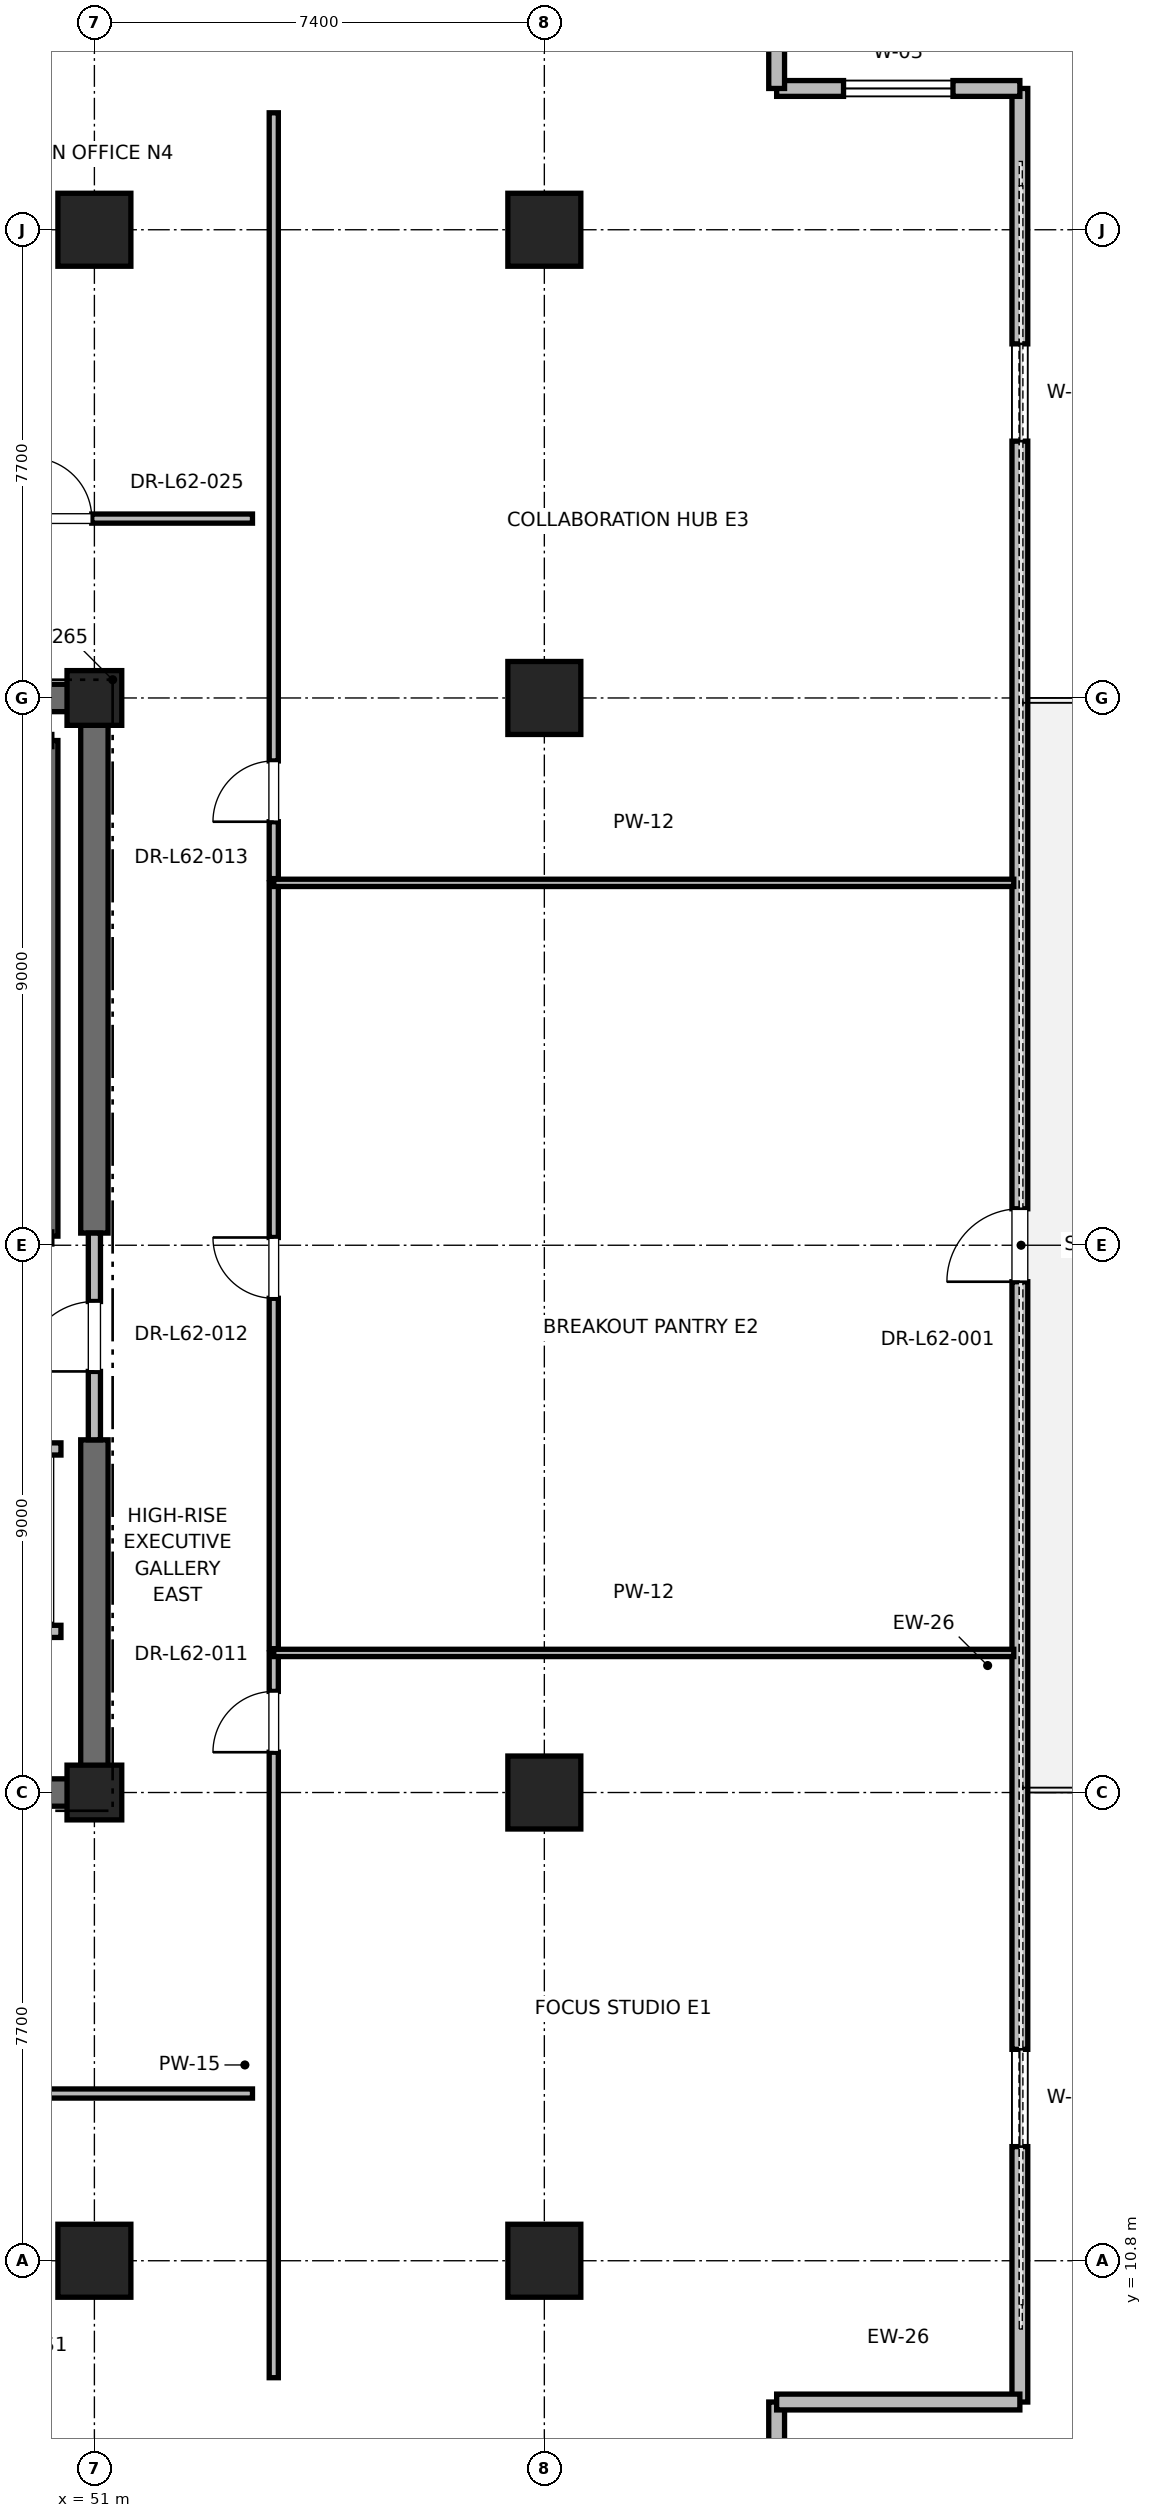
"""IFC4 building model, lengths in metres.
Left out: names, types, materials, properties, quantities, classifications, styles, units other than length and angle.
Written with IfcOpenShell. Run it as: python <this file> out.ifc"""

import sys

from ifc_helpers import new_model, si_unit, direction, frame, frame_2d, origin, origin_2d, place, context, subcontext, project, spatial, rectangle, extrude, element, fill, save


model = new_model("IFC4")
c1 = context("Model", 3, precision=1e-05, world=origin(), true_north=direction((0.0, 1.0)))
c2 = subcontext(c1, "Body", "Model", "MODEL_VIEW")
j1 = project(units=[si_unit("LENGTHUNIT", "METRE"), si_unit("PLANEANGLEUNIT", "RADIAN")], contexts=[c1])
p1 = place(None, origin())
s1 = spatial("IfcSite", under=j1, at=p1, CompositionType="ELEMENT")
p2 = place(p1, origin())
s2 = spatial("IfcBuilding", under=s1, at=p2, CompositionType="ELEMENT")
p3 = place(p2, frame((0.0, 0.0, 267.2)))
s3 = spatial("IfcBuildingStorey", under=s2, at=p3, CompositionType="ELEMENT", Elevation=267.2)
for number, where, z_axis, x_axis in (
    (1, (51.0, 10.8, 0.0), (0.0, 0.0, 1.0), (1.0, 0.0, 0.0)),
    (2, (51.0, 44.2, 0.0), (0.0, 0.0, 1.0), (1.0, 0.0, 0.0)),
    (3, (58.4, 18.5, 0.0), (0.0, 0.0, 1.0), (1.0, 0.0, 0.0)),
    (4, (58.4, 36.5, 0.0), (0.0, 0.0, 1.0), (1.0, 0.0, 0.0)),
    (5, (58.4, 10.8, 0.0), (0.0, 0.0, 1.0), (1.0, 0.0, 0.0)),
    (6, (58.4, 44.2, 0.0), (0.0, 0.0, 1.0), (1.0, 0.0, 0.0)),
):
    element("IfcColumn", number, at=place(p3, frame(where, z_axis=z_axis, x_axis=x_axis)), inside=s3, PredefinedType="COLUMN", context=c2, shape_type="SweptSolid", body=[
        extrude(rectangle(XDim=1.2, YDim=1.2, at=origin_2d()), origin(), (0.0, 0.0, 1.0), 4.0),
    ])
for number, where, z_axis, x_axis in (
    (7, (51.0, 18.5, 0.0), (0.0, 0.0, 1.0), (1.0, 0.0, 0.0)),
    (8, (51.0, 36.5, 0.0), (0.0, 0.0, 1.0), (1.0, 0.0, 0.0)),
):
    element("IfcColumn", number, at=place(p3, frame(where, z_axis=z_axis, x_axis=x_axis)), inside=s3, PredefinedType="PILASTER", context=c2, shape_type="SweptSolid", body=[
        extrude(rectangle(XDim=0.9, YDim=0.9, at=origin_2d()), origin(), (0.0, 0.0, 1.0), 4.0),
    ])
p4 = place(p3, frame((41.8, 18.5, 0.0), z_axis=(0.0, 0.0, 1.0), x_axis=(1.0, 0.0, 0.0)))
e9 = element("IfcWall", 9, at=p4, inside=s3, PredefinedType="SHEAR", context=c2, shape_type="SweptSolid", body=[
    extrude(rectangle(XDim=9.2, YDim=0.45, at=frame_2d((4.6, 0.0))), origin(), (0.0, 0.0, 1.0), 3.785),
])
for number, where, z_axis, x_axis in (
    (10, (45.2, 36.5, 0.0), (0.0, 0.0, 1.0), (1.0, 0.0, 0.0)),
    (11, (51.0, 18.5, 0.0), (0.0, 0.0, 1.0), (0.0, 1.0, 0.0)),
):
    element("IfcWall", number, at=place(p3, frame(where, z_axis=z_axis, x_axis=x_axis)), inside=s3, PredefinedType="SHEAR", context=c2, shape_type="SweptSolid", body=[
        extrude(rectangle(XDim=5.8, YDim=0.45, at=frame_2d((2.9, 0.0))), origin(), (0.0, 0.0, 1.0), 3.785),
    ])
p5 = place(p3, frame((51.0, 27.7, 0.0), z_axis=(0.0, 0.0, 1.0), x_axis=(0.0, 1.0, 0.0)))
e12 = element("IfcWall", 12, at=p5, inside=s3, PredefinedType="SHEAR", context=c2, shape_type="SweptSolid", body=[
    extrude(rectangle(XDim=8.8, YDim=0.45, at=frame_2d((4.4, 0.0))), origin(), (0.0, 0.0, 1.0), 3.785),
])
p6 = place(p3, frame((66.221, 8.477, 0.0), z_axis=(0.0, 0.0, 1.0), x_axis=(0.0, 1.0, 0.0)))
e13 = element("IfcWall", 13, at=p6, inside=s3, PredefinedType="PARAPET", context=c2, shape_type="SweptSolid", body=[
    extrude(rectangle(XDim=38.047, YDim=0.26, at=frame_2d((19.023, 0.0))), origin(), (0.0, 0.0, 1.0), 3.123),
])
p7 = place(p6, frame((4.2, 0.0, 0.85)))
e14 = element("IfcOpeningElement", 14, at=p7, cuts=e13, PredefinedType="OPENING", context=c2, shape_type="SweptSolid", body=[
    extrude(rectangle(XDim=1.6, YDim=2.1, at=frame_2d((0.8, 1.05))), frame((0.0, 0.13, 0.0), z_axis=(0.0, -1.0, 0.0), x_axis=(1.0, 0.0, 0.0)), (0.0, 0.0, 1.0), 0.26),
])
p8 = place(p6, frame((18.423, 0.0, 0.0)))
e15 = element("IfcOpeningElement", 15, at=p8, cuts=e13, PredefinedType="OPENING", context=c2, shape_type="SweptSolid", body=[
    extrude(rectangle(XDim=1.2, YDim=2.2, at=frame_2d((0.6, 1.1))), frame((0.0, 0.13, 0.0), z_axis=(0.0, -1.0, 0.0), x_axis=(1.0, 0.0, 0.0)), (0.0, 0.0, 1.0), 0.26),
])
p9 = place(p6, frame((32.247, 0.0, 0.85)))
e16 = element("IfcOpeningElement", 16, at=p9, cuts=e13, PredefinedType="OPENING", context=c2, shape_type="SweptSolid", body=[
    extrude(rectangle(XDim=1.6, YDim=2.1, at=frame_2d((0.8, 1.05))), frame((0.0, 0.13, 0.0), z_axis=(0.0, -1.0, 0.0), x_axis=(1.0, 0.0, 0.0)), (0.0, 0.0, 1.0), 0.26),
])
p10 = place(p3, frame((62.221, 4.977, 0.0), z_axis=(0.0, 0.0, 1.0), x_axis=(0.0, 1.0, 0.0)))
e17 = element("IfcWall", 17, at=p10, inside=s3, PredefinedType="PARAPET", context=c2, shape_type="SweptSolid", body=[
    extrude(rectangle(XDim=3.5, YDim=0.26, at=frame_2d((1.75, 0.0))), origin(), (0.0, 0.0, 1.0), 3.785),
])
p11 = place(p10, frame((0.85, 0.0, 0.85)))
e18 = element("IfcOpeningElement", 18, at=p11, cuts=e17, PredefinedType="OPENING", context=c2, shape_type="SweptSolid", body=[
    extrude(rectangle(XDim=1.8, YDim=2.2, at=frame_2d((0.9, 1.1))), frame((0.0, 0.13, 0.0), z_axis=(0.0, -1.0, 0.0), x_axis=(1.0, 0.0, 0.0)), (0.0, 0.0, 1.0), 0.26),
])
p12 = place(p3, frame((62.221, 8.477, 0.0), z_axis=(0.0, 0.0, 1.0), x_axis=(1.0, 0.0, 0.0)))
e19 = element("IfcWall", 19, at=p12, inside=s3, PredefinedType="PARAPET", context=c2, shape_type="SweptSolid", body=[
    extrude(rectangle(XDim=4.0, YDim=0.26, at=frame_2d((2.0, 0.0))), origin(), (0.0, 0.0, 1.0), 3.785),
])
p13 = place(p3, frame((66.221, 46.523, 0.0), z_axis=(0.0, 0.0, 1.0), x_axis=(-1.0, 0.0, 0.0)))
e20 = element("IfcWall", 20, at=p13, inside=s3, PredefinedType="PARAPET", context=c2, shape_type="SweptSolid", body=[
    extrude(rectangle(XDim=4.0, YDim=0.26, at=frame_2d((2.0, 0.0))), origin(), (0.0, 0.0, 1.0), 3.785),
])
p14 = place(p13, frame((1.1, 0.0, 0.85)))
e21 = element("IfcOpeningElement", 21, at=p14, cuts=e20, PredefinedType="OPENING", context=c2, shape_type="SweptSolid", body=[
    extrude(rectangle(XDim=1.8, YDim=2.2, at=frame_2d((0.9, 1.1))), frame((0.0, 0.13, 0.0), z_axis=(0.0, -1.0, 0.0), x_axis=(1.0, 0.0, 0.0)), (0.0, 0.0, 1.0), 0.26),
])
p15 = place(p3, frame((62.221, 46.523, 0.0), z_axis=(0.0, 0.0, 1.0), x_axis=(0.0, 1.0, 0.0)))
e22 = element("IfcWall", 22, at=p15, inside=s3, PredefinedType="PARAPET", context=c2, shape_type="SweptSolid", body=[
    extrude(rectangle(XDim=3.5, YDim=0.26, at=frame_2d((1.75, 0.0))), origin(), (0.0, 0.0, 1.0), 3.785),
])
p16 = place(p3, frame((50.3, 27.65, 0.0), z_axis=(0.0, 0.0, 1.0), x_axis=(0.0, 1.0, 0.0)))
e23 = element("IfcWall", 23, at=p16, inside=s3, PredefinedType="SOLIDWALL", context=c2, shape_type="SweptSolid", body=[
    extrude(rectangle(XDim=8.15, YDim=0.2, at=frame_2d((4.075, 0.0))), origin(), (0.0, 0.0, 1.0), 3.785),
])
p17 = place(p3, frame((51.0, 24.3, 0.0), z_axis=(0.0, 0.0, 1.0), x_axis=(0.0, 1.0, 0.0)))
e24 = element("IfcWall", 24, at=p17, inside=s3, PredefinedType="PARTITIONING", context=c2, shape_type="SweptSolid", body=[
    extrude(rectangle(XDim=3.4, YDim=0.2, at=frame_2d((1.7, 0.0))), origin(), (0.0, 0.0, 1.0), 2.865),
])
p18 = place(p17, frame((1.125, 0.0, 0.0)))
e25 = element("IfcOpeningElement", 25, at=p18, cuts=e24, PredefinedType="OPENING", context=c2, shape_type="SweptSolid", body=[
    extrude(rectangle(XDim=1.15, YDim=2.2, at=frame_2d((0.575, 1.1))), frame((0.0, 0.1, 0.0), z_axis=(0.0, -1.0, 0.0), x_axis=(1.0, 0.0, 0.0)), (0.0, 0.0, 1.0), 0.2),
])
p19 = place(p3, frame((47.85, 21.15, 0.0), z_axis=(0.0, 0.0, 1.0), x_axis=(1.0, 0.0, 0.0)))
e26 = element("IfcWall", 26, at=p19, inside=s3, PredefinedType="SOLIDWALL", context=c2, shape_type="SweptSolid", body=[
    extrude(rectangle(XDim=2.6, YDim=0.2, at=frame_2d((1.3, 0.0))), origin(), (0.0, 0.0, 1.0), 3.785),
])
p20 = place(p3, frame((50.45, 24.15, 0.0), z_axis=(0.0, 0.0, 1.0), x_axis=(-1.0, 0.0, 0.0)))
e27 = element("IfcWall", 27, at=p20, inside=s3, PredefinedType="SOLIDWALL", context=c2, shape_type="SweptSolid", body=[
    extrude(rectangle(XDim=2.6, YDim=0.2, at=frame_2d((1.3, 0.0))), origin(), (0.0, 0.0, 1.0), 2.865),
])
p21 = place(p20, frame((0.75, 0.0, 0.0)))
e28 = element("IfcOpeningElement", 28, at=p21, cuts=e27, PredefinedType="OPENING", context=c2, shape_type="SweptSolid", body=[
    extrude(rectangle(XDim=1.1, YDim=2.2, at=frame_2d((0.55, 1.1))), frame((0.0, 0.1, 0.0), z_axis=(0.0, -1.0, 0.0), x_axis=(1.0, 0.0, 0.0)), (0.0, 0.0, 1.0), 0.2),
])
p22 = place(p3, frame((47.414, 39.45, 0.0), z_axis=(0.0, 0.0, 1.0), x_axis=(1.0, 0.0, 0.0)))
e29 = element("IfcWall", 29, at=p22, inside=s3, PredefinedType="PARTITIONING", context=c2, shape_type="SweptSolid", body=[
    extrude(rectangle(XDim=6.186, YDim=0.15, at=frame_2d((3.093, 0.0))), origin(), (0.0, 0.0, 1.0), 2.85),
])
p23 = place(p22, frame((2.543, 0.0, 0.0)))
e30 = element("IfcOpeningElement", 30, at=p23, cuts=e29, PredefinedType="OPENING", context=c2, shape_type="SweptSolid", body=[
    extrude(rectangle(XDim=1.0, YDim=2.15, at=frame_2d((0.5, 1.075))), frame((0.0, 0.075, 0.0), z_axis=(0.0, -1.0, 0.0), x_axis=(1.0, 0.0, 0.0)), (0.0, 0.0, 1.0), 0.15),
])
p24 = place(p3, frame((26.4, 13.55, 0.0), z_axis=(0.0, 0.0, 1.0), x_axis=(1.0, 0.0, 0.0)))
e31 = element("IfcWall", 31, at=p24, inside=s3, PredefinedType="PARTITIONING", context=c2, shape_type="SweptSolid", body=[
    extrude(rectangle(XDim=27.2, YDim=0.15, at=frame_2d((13.6, 0.0))), origin(), (0.0, 0.0, 1.0), 2.85),
])
p25 = place(p24, frame((13.075, 0.0, 0.0)))
e32 = element("IfcOpeningElement", 32, at=p25, cuts=e31, PredefinedType="OPENING", context=c2, shape_type="SweptSolid", body=[
    extrude(rectangle(XDim=1.05, YDim=2.2, at=frame_2d((0.525, 1.1))), frame((0.0, 0.075, 0.0), z_axis=(0.0, -1.0, 0.0), x_axis=(1.0, 0.0, 0.0)), (0.0, 0.0, 1.0), 0.15),
])
p26 = place(p3, frame((53.95, 8.877, 0.0), z_axis=(0.0, 0.0, 1.0), x_axis=(0.0, 1.0, 0.0)))
e33 = element("IfcWall", 33, at=p26, inside=s3, PredefinedType="PARTITIONING", context=c2, shape_type="SweptSolid", body=[
    extrude(rectangle(XDim=11.919, YDim=0.15, at=frame_2d((5.959, 0.0))), origin(), (0.0, 0.0, 1.0), 2.85),
])
p27 = place(p26, frame((10.286, 0.0, 0.0)))
e34 = element("IfcOpeningElement", 34, at=p27, cuts=e33, PredefinedType="OPENING", context=c2, shape_type="SweptSolid", body=[
    extrude(rectangle(XDim=1.0, YDim=2.15, at=frame_2d((0.5, 1.075))), frame((0.0, 0.075, 0.0), z_axis=(0.0, -1.0, 0.0), x_axis=(1.0, 0.0, 0.0)), (0.0, 0.0, 1.0), 0.15),
])
p28 = place(p3, frame((53.95, 20.796, 0.0), z_axis=(0.0, 0.0, 1.0), x_axis=(1.0, 0.0, 0.0)))
e35 = element("IfcWall", 35, at=p28, inside=s3, PredefinedType="PARTITIONING", context=c2, shape_type="SweptSolid", body=[
    extrude(rectangle(XDim=12.171, YDim=0.12, at=frame_2d((6.085, 0.0))), origin(), (0.0, 0.0, 1.0), 2.85),
])
p29 = place(p3, frame((53.95, 20.865, 0.0), z_axis=(0.0, 0.0, 1.0), x_axis=(0.0, 1.0, 0.0)))
e36 = element("IfcWall", 36, at=p29, inside=s3, PredefinedType="PARTITIONING", context=c2, shape_type="SweptSolid", body=[
    extrude(rectangle(XDim=12.594, YDim=0.15, at=frame_2d((6.297, 0.0))), origin(), (0.0, 0.0, 1.0), 2.85),
])
p30 = place(p29, frame((5.762, 0.0, 0.0)))
e37 = element("IfcOpeningElement", 37, at=p30, cuts=e36, PredefinedType="OPENING", context=c2, shape_type="SweptSolid", body=[
    extrude(rectangle(XDim=1.0, YDim=2.15, at=frame_2d((0.5, 1.075))), frame((0.0, 0.075, 0.0), z_axis=(0.0, -1.0, 0.0), x_axis=(1.0, 0.0, 0.0)), (0.0, 0.0, 1.0), 0.15),
])
p31 = place(p3, frame((53.95, 33.459, 0.0), z_axis=(0.0, 0.0, 1.0), x_axis=(1.0, 0.0, 0.0)))
e38 = element("IfcWall", 38, at=p31, inside=s3, PredefinedType="PARTITIONING", context=c2, shape_type="SweptSolid", body=[
    extrude(rectangle(XDim=12.171, YDim=0.12, at=frame_2d((6.085, 0.0))), origin(), (0.0, 0.0, 1.0), 2.85),
])
p32 = place(p3, frame((53.95, 33.53, 0.0), z_axis=(0.0, 0.0, 1.0), x_axis=(0.0, 1.0, 0.0)))
e39 = element("IfcWall", 39, at=p32, inside=s3, PredefinedType="PARTITIONING", context=c2, shape_type="SweptSolid", body=[
    extrude(rectangle(XDim=12.594, YDim=0.15, at=frame_2d((6.297, 0.0))), origin(), (0.0, 0.0, 1.0), 2.85),
])
p33 = place(p32, frame((0.935, 0.0, 0.0)))
e40 = element("IfcOpeningElement", 40, at=p33, cuts=e39, PredefinedType="OPENING", context=c2, shape_type="SweptSolid", body=[
    extrude(rectangle(XDim=1.0, YDim=2.15, at=frame_2d((0.5, 1.075))), frame((0.0, 0.075, 0.0), z_axis=(0.0, -1.0, 0.0), x_axis=(1.0, 0.0, 0.0)), (0.0, 0.0, 1.0), 0.15),
])
p34 = place(p7, origin())
e41 = element("IfcWindow", 41, at=p34, inside=s3, PartitioningType="SINGLE_PANEL", PredefinedType="WINDOW", context=c2, shape_type="SweptSolid", body=[
    extrude(rectangle(XDim=1.6, YDim=2.1, at=frame_2d((0.8, 1.05))), frame((0.0, 0.03, 0.0), z_axis=(0.0, -1.0, 0.0), x_axis=(1.0, 0.0, 0.0)), (0.0, 0.0, 1.0), 0.06),
])
fill(e14, e41)
p35 = place(p8, origin())
e42 = element("IfcDoor", 42, at=p35, inside=s3, OperationType="SINGLE_SWING_LEFT", PredefinedType="DOOR", context=c2, shape_type="SweptSolid", body=[
    extrude(rectangle(XDim=1.2, YDim=2.2, at=frame_2d((0.6, 1.1))), frame((0.0, 0.025, 0.0), z_axis=(0.0, -1.0, 0.0), x_axis=(1.0, 0.0, 0.0)), (0.0, 0.0, 1.0), 0.05),
])
fill(e15, e42)
p36 = place(p9, origin())
e43 = element("IfcWindow", 43, at=p36, inside=s3, PartitioningType="SINGLE_PANEL", PredefinedType="WINDOW", context=c2, shape_type="SweptSolid", body=[
    extrude(rectangle(XDim=1.6, YDim=2.1, at=frame_2d((0.8, 1.05))), frame((0.0, 0.03, 0.0), z_axis=(0.0, -1.0, 0.0), x_axis=(1.0, 0.0, 0.0)), (0.0, 0.0, 1.0), 0.06),
])
fill(e16, e43)
p37 = place(p14, origin())
e44 = element("IfcWindow", 44, at=p37, inside=s3, PartitioningType="SINGLE_PANEL", PredefinedType="WINDOW", context=c2, shape_type="SweptSolid", body=[
    extrude(rectangle(XDim=1.8, YDim=2.2, at=frame_2d((0.9, 1.1))), frame((0.0, 0.03, 0.0), z_axis=(0.0, -1.0, 0.0), x_axis=(1.0, 0.0, 0.0)), (0.0, 0.0, 1.0), 0.06),
])
fill(e21, e44)
p38 = place(p18, origin())
e45 = element("IfcDoor", 45, at=p38, inside=s3, OperationType="SINGLE_SWING_LEFT", PredefinedType="DOOR", context=c2, shape_type="SweptSolid", body=[
    extrude(rectangle(XDim=1.15, YDim=2.2, at=frame_2d((0.575, 1.1))), frame((0.0, 0.025, 0.0), z_axis=(0.0, -1.0, 0.0), x_axis=(1.0, 0.0, 0.0)), (0.0, 0.0, 1.0), 0.05),
])
fill(e25, e45)
p39 = place(p23, origin())
e46 = element("IfcDoor", 46, at=p39, inside=s3, OperationType="SINGLE_SWING_LEFT", PredefinedType="DOOR", context=c2, shape_type="SweptSolid", body=[
    extrude(rectangle(XDim=1.0, YDim=2.15, at=frame_2d((0.5, 1.075))), frame((0.0, 0.025, 0.0), z_axis=(0.0, -1.0, 0.0), x_axis=(1.0, 0.0, 0.0)), (0.0, 0.0, 1.0), 0.05),
])
fill(e30, e46)
p40 = place(p27, origin())
e47 = element("IfcDoor", 47, at=p40, inside=s3, OperationType="SINGLE_SWING_LEFT", PredefinedType="DOOR", context=c2, shape_type="SweptSolid", body=[
    extrude(rectangle(XDim=1.0, YDim=2.15, at=frame_2d((0.5, 1.075))), frame((0.0, 0.025, 0.0), z_axis=(0.0, -1.0, 0.0), x_axis=(1.0, 0.0, 0.0)), (0.0, 0.0, 1.0), 0.05),
])
fill(e34, e47)
p41 = place(p30, origin())
e48 = element("IfcDoor", 48, at=p41, inside=s3, OperationType="SINGLE_SWING_RIGHT", PredefinedType="DOOR", context=c2, shape_type="SweptSolid", body=[
    extrude(rectangle(XDim=1.0, YDim=2.15, at=frame_2d((0.5, 1.075))), frame((0.0, 0.025, 0.0), z_axis=(0.0, -1.0, 0.0), x_axis=(1.0, 0.0, 0.0)), (0.0, 0.0, 1.0), 0.05),
])
fill(e37, e48)
p42 = place(p33, origin())
e49 = element("IfcDoor", 49, at=p42, inside=s3, OperationType="SINGLE_SWING_LEFT", PredefinedType="DOOR", context=c2, shape_type="SweptSolid", body=[
    extrude(rectangle(XDim=1.0, YDim=2.15, at=frame_2d((0.5, 1.075))), frame((0.0, 0.025, 0.0), z_axis=(0.0, -1.0, 0.0), x_axis=(1.0, 0.0, 0.0)), (0.0, 0.0, 1.0), 0.05),
])
fill(e40, e49)
save(model, sys.argv[1])
